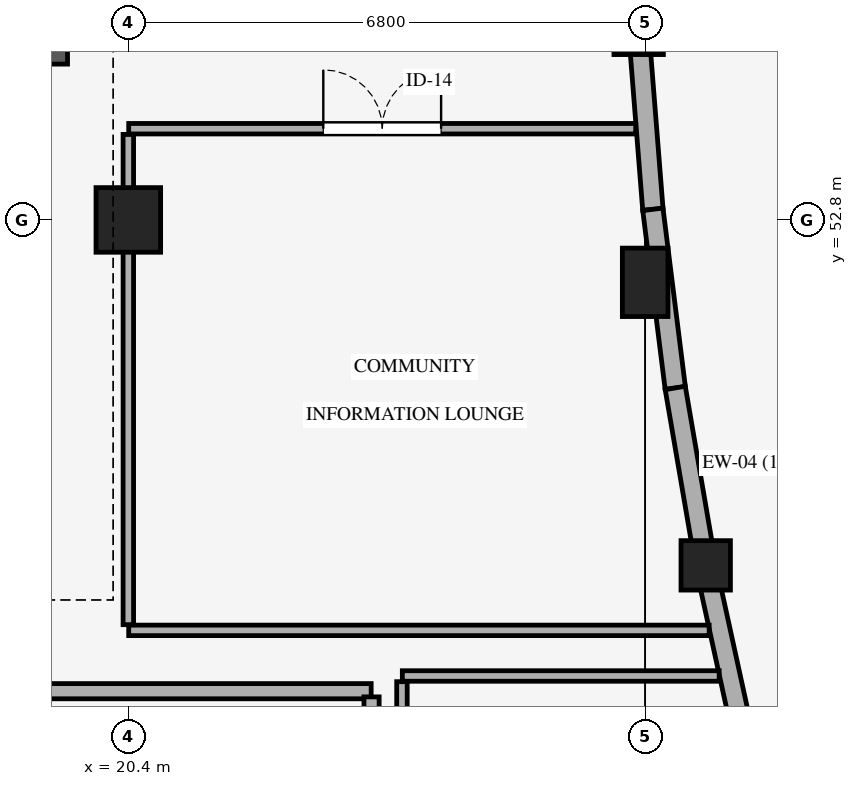
"""IFC4 building model, lengths in metres.
Left out: names, types, materials, properties, quantities, classifications, styles, units other than length and angle.
Written with IfcOpenShell. Run it as: python <this file> out.ifc"""

import sys

from ifc_helpers import new_model, si_unit, direction, frame, frame_2d, origin, origin_2d, place, context, subcontext, project, spatial, rectangle, circle, extrude, element, fill, save


model = new_model("IFC4")
c1 = context("Model", 3, precision=1e-05, world=origin(), true_north=direction((0.0, 1.0)))
c2 = subcontext(c1, "Body", "Model", "MODEL_VIEW")
j1 = project(units=[si_unit("LENGTHUNIT", "METRE"), si_unit("PLANEANGLEUNIT", "RADIAN")], contexts=[c1])
p1 = place(None, origin())
s1 = spatial("IfcSite", under=j1, at=p1, CompositionType="ELEMENT")
p2 = place(p1, origin())
s2 = spatial("IfcBuilding", under=s1, at=p2, CompositionType="ELEMENT")
p3 = place(p2, origin())
s3 = spatial("IfcBuildingStorey", under=s2, at=p3, CompositionType="ELEMENT", Elevation=0.0)
p4 = place(p3, frame((20.4, 52.8, 0.0), z_axis=(0.0, 0.0, 1.0), x_axis=(1.0, 0.0, 0.0)))
e1 = element("IfcColumn", 1, at=p4, inside=s3, PredefinedType="COLUMN", context=c2, shape_type="SweptSolid", body=[
    extrude(rectangle(XDim=0.85, YDim=0.85, at=origin_2d()), origin(), (0.0, 0.0, 1.0), 4.8),
])
p5 = place(p3, frame((27.115, 55.3, 0.0), z_axis=(0.0, 0.0, 1.0), x_axis=(1.0, 0.0, 0.0)))
e2 = element("IfcColumn", 2, at=p5, inside=s3, PredefinedType="COLUMN", context=c2, shape_type="SweptSolid", body=[
    extrude(circle(Radius=0.325, at=origin_2d()), origin(), (0.0, 0.0, 1.0), 4.8),
])
p6 = place(p3, frame((27.2, 51.979, 0.0), z_axis=(0.0, 0.0, 1.0), x_axis=(1.0, 0.0, 0.0)))
e3 = element("IfcColumn", 3, at=p6, inside=s3, PredefinedType="COLUMN", context=c2, shape_type="SweptSolid", body=[
    extrude(rectangle(XDim=0.6, YDim=0.9, at=origin_2d()), origin(), (0.0, 0.0, 1.0), 4.8),
])
p7 = place(p3, frame((27.997, 48.255, 0.0), z_axis=(0.0, 0.0, 1.0), x_axis=(1.0, 0.0, 0.0)))
e4 = element("IfcColumn", 4, at=p7, inside=s3, PredefinedType="COLUMN", context=c2, shape_type="SweptSolid", body=[
    extrude(circle(Radius=0.325, at=origin_2d()), origin(), (0.0, 0.0, 1.0), 4.8),
])
p8 = place(p3, frame((27.115, 55.3, 0.0), z_axis=(0.0, 0.0, 1.0), x_axis=(0.078966698752, -0.996877254474, 0.0)))
e5 = element("IfcWall", 5, at=p8, inside=s3, PredefinedType="STANDARD", context=c2, shape_type="SweptSolid", body=[
    extrude(rectangle(XDim=2.368, YDim=0.268, at=frame_2d((1.184, 0.0))), origin(), (0.0, 0.0, 1.0), 3.67),
])
p9 = place(p3, frame((27.302, 52.939, 0.0), z_axis=(0.0, 0.0, 1.0), x_axis=(0.124212348728, -0.992255658801, 0.0)))
e6 = element("IfcWall", 6, at=p9, inside=s3, PredefinedType="STANDARD", context=c2, shape_type="SweptSolid", body=[
    extrude(rectangle(XDim=2.368, YDim=0.268, at=frame_2d((1.184, 0.0))), origin(), (0.0, 0.0, 1.0), 3.62),
])
p10 = place(p3, frame((27.596, 50.589, 0.0), z_axis=(0.0, 0.0, 1.0), x_axis=(0.169378698951, -0.985551041977, 0.0)))
e7 = element("IfcWall", 7, at=p10, inside=s3, PredefinedType="STANDARD", context=c2, shape_type="SweptSolid", body=[
    extrude(rectangle(XDim=2.368, YDim=0.268, at=frame_2d((1.184, 0.0))), origin(), (0.0, 0.0, 1.0), 3.62),
])
p11 = place(p3, frame((27.997, 48.255, 0.0), z_axis=(0.0, 0.0, 1.0), x_axis=(0.214004297627, -0.97683271884, 0.0)))
e8 = element("IfcWall", 8, at=p11, inside=s3, PredefinedType="STANDARD", context=c2, shape_type="SweptSolid", body=[
    extrude(rectangle(XDim=2.368, YDim=0.268, at=frame_2d((1.184, 0.0))), origin(), (0.0, 0.0, 1.0), 3.82),
])
p12 = place(p3, frame((19.6, 54.975, 0.0), z_axis=(0.0, 0.0, 1.0), x_axis=(-1.0, 0.0, 0.0)))
e9 = element("IfcWall", 9, at=p12, inside=s3, PredefinedType="SHEAR", context=c2, shape_type="SweptSolid", body=[
    extrude(rectangle(XDim=3.1, YDim=0.25, at=frame_2d((1.55, 0.0))), origin(), (0.0, 0.0, 1.0), 4.52),
])
p13 = place(p12, frame((0.9, 0.0, 0.0)))
e10 = element("IfcOpeningElement", 10, at=p13, cuts=e9, PredefinedType="OPENING", context=c2, shape_type="SweptSolid", body=[
    extrude(rectangle(XDim=1.0, YDim=2.15, at=frame_2d((0.5, 1.075))), frame((0.0, 0.135, 0.0), z_axis=(0.0, -1.0, 0.0), x_axis=(1.0, 0.0, 0.0)), (0.0, 0.0, 1.0), 0.27),
])
p14 = place(p3, frame((24.0, 26.075, 0.0), z_axis=(0.0, 0.0, 1.0), x_axis=(0.0, 1.0, 0.0)))
e11 = element("IfcWall", 11, at=p14, inside=s3, PredefinedType="STANDARD", context=c2, shape_type="SweptSolid", body=[
    extrude(rectangle(XDim=20.65, YDim=0.138, at=frame_2d((10.325, 0.0))), origin(), (0.0, 0.0, 1.0), 4.49),
])
p15 = place(p3, frame((24.005, 46.8, 0.0), z_axis=(0.0, 0.0, 1.0), x_axis=(1.0, 0.0, 0.0)))
e12 = element("IfcWall", 12, at=p15, inside=s3, PredefinedType="STANDARD", context=c2, shape_type="SweptSolid", body=[
    extrude(rectangle(XDim=4.169, YDim=0.138, at=frame_2d((2.084, 0.0))), origin(), (0.0, 0.0, 1.0), 3.62),
])
p16 = place(p3, frame((28.042, 47.4, 0.0), z_axis=(0.0, 0.0, 1.0), x_axis=(-1.0, 0.0, 0.0)))
e13 = element("IfcWall", 13, at=p16, inside=s3, PredefinedType="STANDARD", context=c2, shape_type="SweptSolid", body=[
    extrude(rectangle(XDim=7.637, YDim=0.138, at=frame_2d((3.819, 0.0))), origin(), (0.0, 0.0, 1.0), 3.62),
])
p17 = place(p3, frame((20.4, 47.475, 0.0), z_axis=(0.0, 0.0, 1.0), x_axis=(0.0, 1.0, 0.0)))
e14 = element("IfcWall", 14, at=p17, inside=s3, PredefinedType="STANDARD", context=c2, shape_type="SweptSolid", body=[
    extrude(rectangle(XDim=6.45, YDim=0.138, at=frame_2d((3.225, 0.0))), origin(), (0.0, 0.0, 1.0), 3.62),
])
p18 = place(p3, frame((20.405, 54.0, 0.0), z_axis=(0.0, 0.0, 1.0), x_axis=(1.0, 0.0, 0.0)))
e15 = element("IfcWall", 15, at=p18, inside=s3, PredefinedType="STANDARD", context=c2, shape_type="SweptSolid", body=[
    extrude(rectangle(XDim=6.67, YDim=0.138, at=frame_2d((3.335, 0.0))), origin(), (0.0, 0.0, 1.0), 3.62),
])
p19 = place(p18, frame((2.56, 0.0, 0.0)))
e16 = element("IfcOpeningElement", 16, at=p19, cuts=e15, PredefinedType="OPENING", context=c2, shape_type="SweptSolid", body=[
    extrude(rectangle(XDim=1.55, YDim=2.24, at=frame_2d((0.775, 1.12))), frame((0.0, 0.079, 0.0), z_axis=(0.0, -1.0, 0.0), x_axis=(1.0, 0.0, 0.0)), (0.0, 0.0, 1.0), 0.158),
])
p20 = place(p3, frame((10.405, 46.6, 0.0), z_axis=(0.0, 0.0, 1.0), x_axis=(1.0, 0.0, 0.0)))
e17 = element("IfcWall", 17, at=p20, inside=s3, PredefinedType="STANDARD", context=c2, shape_type="SweptSolid", body=[
    extrude(rectangle(XDim=13.19, YDim=0.2, at=frame_2d((6.595, 0.0))), origin(), (0.0, 0.0, 1.0), 4.49),
])
p21 = place(p3, frame((23.6, 46.525, 0.0), z_axis=(0.0, 0.0, 1.0), x_axis=(0.0, -1.0, 0.0)))
e18 = element("IfcWall", 18, at=p21, inside=s3, PredefinedType="STANDARD", context=c2, shape_type="SweptSolid", body=[
    extrude(rectangle(XDim=36.05, YDim=0.2, at=frame_2d((18.025, 0.0))), origin(), (0.0, 0.0, 1.0), 4.49),
])
p22 = place(p21, frame((21.173, 0.0, 0.0)))
e19 = element("IfcOpeningElement", 19, at=p22, cuts=e18, PredefinedType="OPENING", context=c2, shape_type="SweptSolid", body=[
    extrude(rectangle(XDim=1.9, YDim=2.35, at=frame_2d((0.95, 1.175))), frame((0.0, 0.11, 0.0), z_axis=(0.0, -1.0, 0.0), x_axis=(1.0, 0.0, 0.0)), (0.0, 0.0, 1.0), 0.22),
])
p23 = place(p19, origin())
e20 = element("IfcDoor", 20, at=p23, inside=s3, OperationType="DOUBLE_DOOR_SINGLE_SWING", PredefinedType="DOOR", context=c2, shape_type="SweptSolid", body=[
    extrude(rectangle(XDim=1.55, YDim=2.24, at=frame_2d((0.775, 1.12))), frame((0.0, 0.025, 0.0), z_axis=(0.0, -1.0, 0.0), x_axis=(1.0, 0.0, 0.0)), (0.0, 0.0, 1.0), 0.05),
])
fill(e16, e20)
save(model, sys.argv[1])
